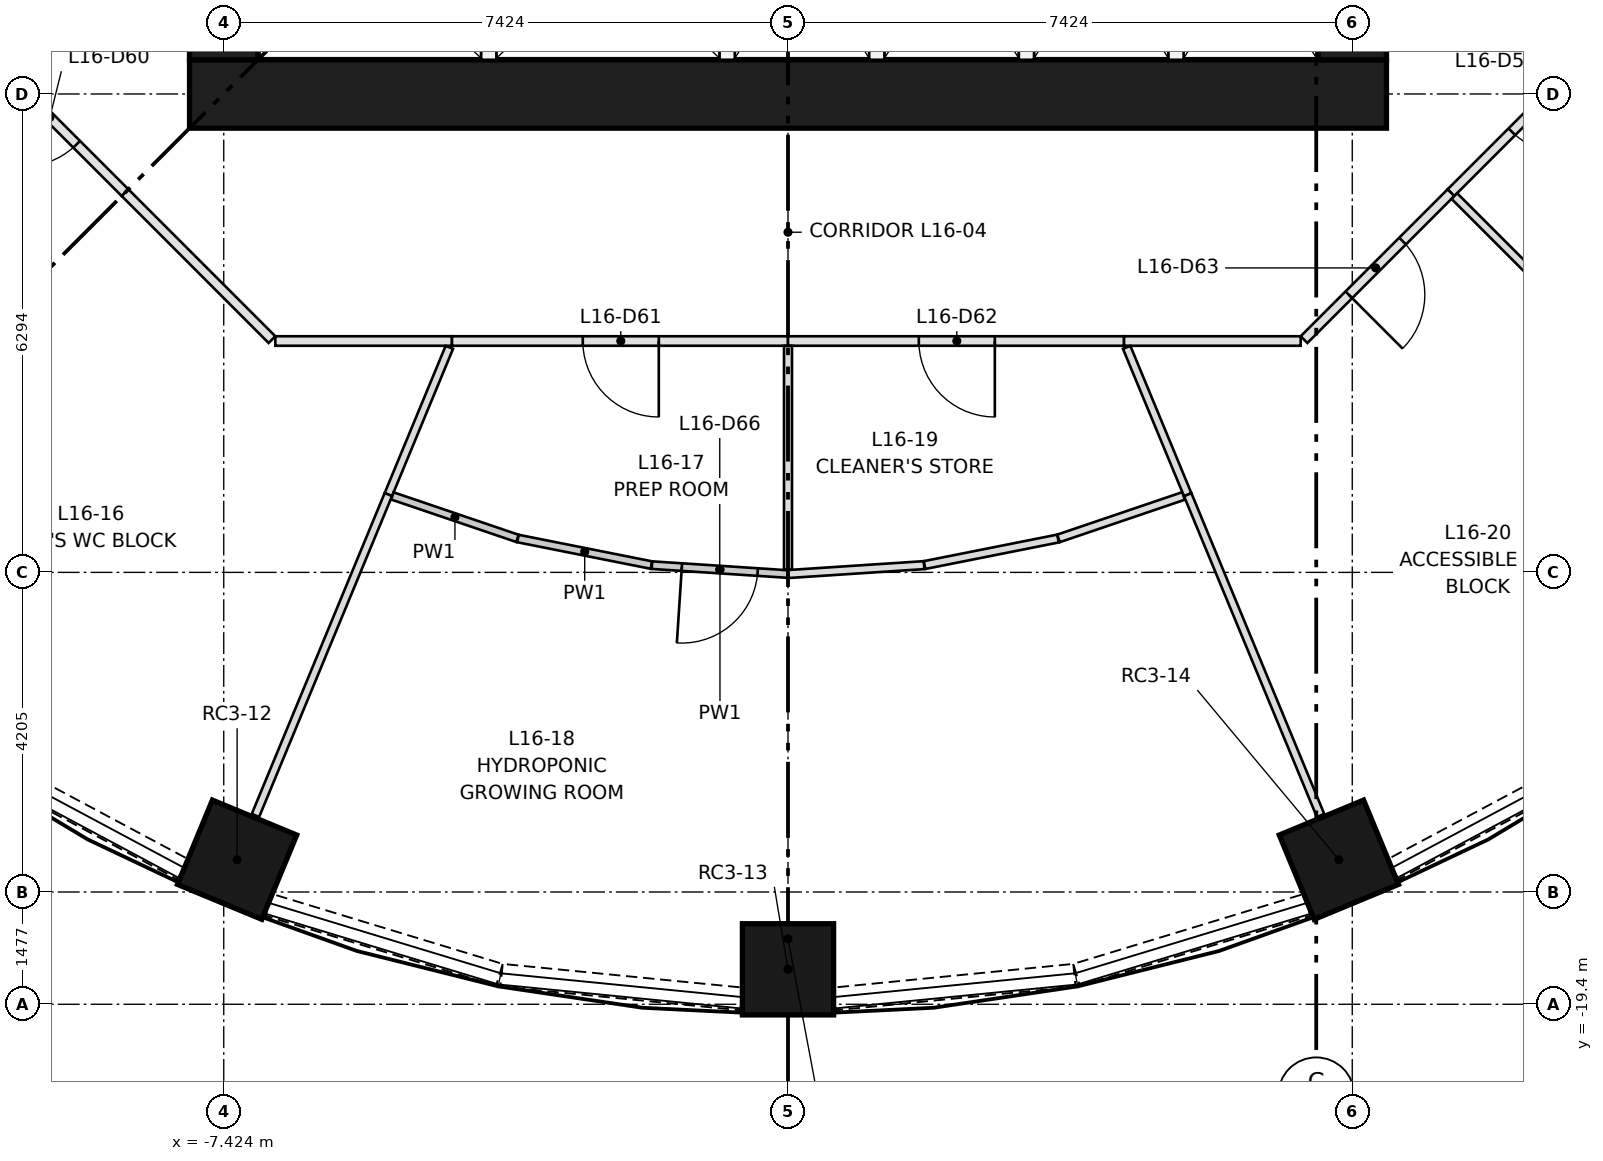
"""IFC4 building model, lengths in metres.
Left out: names, types, materials, properties, quantities, classifications, styles, units other than length and angle.
Written with IfcOpenShell. Run it as: python <this file> out.ifc"""

import sys

from ifc_helpers import new_model, si_unit, direction, frame, frame_2d, origin, origin_2d, place, context, subcontext, project, spatial, rectangle, extrude, element, fill, save


model = new_model("IFC4")
c1 = context("Model", 3, precision=1e-05, world=origin(), true_north=direction((0.0, 1.0)))
c2 = subcontext(c1, "Body", "Model", "MODEL_VIEW")
j1 = project(units=[si_unit("LENGTHUNIT", "METRE"), si_unit("PLANEANGLEUNIT", "RADIAN")], contexts=[c1])
p1 = place(None, origin())
s1 = spatial("IfcSite", under=j1, at=p1, CompositionType="ELEMENT")
p2 = place(p1, origin())
s2 = spatial("IfcBuilding", under=s1, at=p2, CompositionType="ELEMENT")
p3 = place(p2, frame((0.0, 0.0, 62.7)))
s3 = spatial("IfcBuildingStorey", under=s2, at=p3, CompositionType="ELEMENT", Elevation=62.7)
for number, where, z_axis, x_axis in (
    (1, (-7.248, -17.498, 0.0), (0.0, 0.0, 1.0), (-0.383, -0.924, 0.0)),
    (2, (0.0, -18.94, 0.0), (0.0, 0.0, 1.0), (0.0, -1.0, 0.0)),
    (3, (7.248, -17.498, 0.0), (0.0, 0.0, 1.0), (0.383, -0.924, 0.0)),
):
    element("IfcColumn", number, at=place(p3, frame(where, z_axis=z_axis, x_axis=x_axis)), inside=s3, PredefinedType="COLUMN", context=c2, shape_type="SweptSolid", body=[
        extrude(rectangle(XDim=1.2, YDim=1.2, at=origin_2d()), origin(), (0.0, 0.0, 1.0), 3.65),
    ])
p4 = place(p3, frame((-7.874, -7.424, 0.0), z_axis=(0.0, 0.0, 1.0), x_axis=(1.0, 0.0, 0.0)))
e4 = element("IfcWall", 4, at=p4, inside=s3, PredefinedType="SHEAR", context=c2, shape_type="SweptSolid", body=[
    extrude(rectangle(XDim=15.748, YDim=0.9, at=frame_2d((7.874, 0.0))), origin(), (0.0, 0.0, 1.0), 3.65),
])
p5 = place(p3, frame((-7.424, -6.974, 0.0), z_axis=(0.0, 0.0, 1.0), x_axis=(0.0, 1.0, 0.0)))
e5 = element("IfcWall", 5, at=p5, inside=s3, PredefinedType="SHEAR", context=c2, shape_type="SweptSolid", body=[
    extrude(rectangle(XDim=13.948, YDim=0.9, at=frame_2d((6.974, 0.0))), origin(), (0.0, 0.0, 1.0), 3.65),
])
p6 = place(p5, frame((6.474, 0.0, 0.0)))
e6 = element("IfcOpeningElement", 6, at=p6, cuts=e5, PredefinedType="OPENING", context=c2, shape_type="SweptSolid", body=[
    extrude(rectangle(XDim=1.0, YDim=2.1, at=frame_2d((0.5, 1.05))), frame((0.0, 0.46, 0.0), z_axis=(0.0, -1.0, 0.0), x_axis=(1.0, 0.0, 0.0)), (0.0, 0.0, 1.0), 0.92),
])
p7 = place(p5, frame((3.35, 0.0, 0.0)))
e7 = element("IfcOpeningElement", 7, at=p7, cuts=e5, PredefinedType="OPENING", context=c2, shape_type="SweptSolid", body=[
    extrude(rectangle(XDim=1.8, YDim=2.1, at=frame_2d((0.9, 1.05))), frame((0.0, 0.46, 0.0), z_axis=(0.0, -1.0, 0.0), x_axis=(1.0, 0.0, 0.0)), (0.0, 0.0, 1.0), 0.92),
])
p8 = place(p5, frame((8.799, 0.0, 0.0)))
e8 = element("IfcOpeningElement", 8, at=p8, cuts=e5, PredefinedType="OPENING", context=c2, shape_type="SweptSolid", body=[
    extrude(rectangle(XDim=1.8, YDim=2.1, at=frame_2d((0.9, 1.05))), frame((0.0, 0.46, 0.0), z_axis=(0.0, -1.0, 0.0), x_axis=(1.0, 0.0, 0.0)), (0.0, 0.0, 1.0), 0.92),
])
p9 = place(p5, frame((11.974, 0.0, 0.0)))
e9 = element("IfcOpeningElement", 9, at=p9, cuts=e5, PredefinedType="OPENING", context=c2, shape_type="SweptSolid", body=[
    extrude(rectangle(XDim=1.0, YDim=2.1, at=frame_2d((0.5, 1.05))), frame((0.0, 0.46, 0.0), z_axis=(0.0, -1.0, 0.0), x_axis=(1.0, 0.0, 0.0)), (0.0, 0.0, 1.0), 0.92),
])
p10 = place(p3, frame((7.424, -6.974, 0.0), z_axis=(0.0, 0.0, 1.0), x_axis=(0.0, 1.0, 0.0)))
e10 = element("IfcWall", 10, at=p10, inside=s3, PredefinedType="SHEAR", context=c2, shape_type="SweptSolid", body=[
    extrude(rectangle(XDim=13.948, YDim=0.9, at=frame_2d((6.974, 0.0))), origin(), (0.0, 0.0, 1.0), 3.65),
])
p11 = place(p10, frame((6.474, 0.0, 0.0)))
e11 = element("IfcOpeningElement", 11, at=p11, cuts=e10, PredefinedType="OPENING", context=c2, shape_type="SweptSolid", body=[
    extrude(rectangle(XDim=1.0, YDim=2.1, at=frame_2d((0.5, 1.05))), frame((0.0, 0.46, 0.0), z_axis=(0.0, -1.0, 0.0), x_axis=(1.0, 0.0, 0.0)), (0.0, 0.0, 1.0), 0.92),
])
p12 = place(p10, frame((3.35, 0.0, 0.0)))
e12 = element("IfcOpeningElement", 12, at=p12, cuts=e10, PredefinedType="OPENING", context=c2, shape_type="SweptSolid", body=[
    extrude(rectangle(XDim=1.8, YDim=2.1, at=frame_2d((0.9, 1.05))), frame((0.0, 0.46, 0.0), z_axis=(0.0, -1.0, 0.0), x_axis=(1.0, 0.0, 0.0)), (0.0, 0.0, 1.0), 0.92),
])
p13 = place(p10, frame((8.799, 0.0, 0.0)))
e13 = element("IfcOpeningElement", 13, at=p13, cuts=e10, PredefinedType="OPENING", context=c2, shape_type="SweptSolid", body=[
    extrude(rectangle(XDim=1.8, YDim=2.1, at=frame_2d((0.9, 1.05))), frame((0.0, 0.46, 0.0), z_axis=(0.0, -1.0, 0.0), x_axis=(1.0, 0.0, 0.0)), (0.0, 0.0, 1.0), 0.92),
])
for number, where, z_axis, x_axis in (
    (14, (-3.937, -6.974, 0.0), (0.0, 0.0, 1.0), (0.0, 1.0, 0.0)),
    (15, (-0.8, -6.974, 0.0), (0.0, 0.0, 1.0), (0.0, 1.0, 0.0)),
    (16, (1.168, -6.974, 0.0), (0.0, 0.0, 1.0), (0.0, 1.0, 0.0)),
    (17, (3.137, -6.974, 0.0), (0.0, 0.0, 1.0), (0.0, 1.0, 0.0)),
    (18, (5.105, -6.974, 0.0), (0.0, 0.0, 1.0), (0.0, 1.0, 0.0)),
):
    element("IfcWall", number, at=place(p3, frame(where, z_axis=z_axis, x_axis=x_axis)), inside=s3, PredefinedType="PARTITIONING", context=c2, shape_type="SweptSolid", body=[
        extrude(rectangle(XDim=2.8, YDim=0.2, at=frame_2d((1.4, 0.0))), origin(), (0.0, 0.0, 1.0), 3.3),
    ])
p14 = place(p3, frame((-10.759, -16.129, 0.0), z_axis=(0.0, 0.0, 1.0), x_axis=(0.882007292685, -0.47123575379, 0.0)))
e19 = element("IfcWall", 19, at=p14, inside=s3, PredefinedType="SOLIDWALL", context=c2, shape_type="SweptSolid", body=[
    extrude(rectangle(XDim=3.17, YDim=0.3, at=frame_2d((1.585, 0.0))), origin(), (0.0, 0.0, 1.0), 0.9),
])
p15 = place(p3, frame((-6.83, -18.092, 0.0), z_axis=(0.0, 0.0, 1.0), x_axis=(0.956888224489, -0.290456409527, 0.0)))
e20 = element("IfcWall", 20, at=p15, inside=s3, PredefinedType="SOLIDWALL", context=c2, shape_type="SweptSolid", body=[
    extrude(rectangle(XDim=3.169, YDim=0.3, at=frame_2d((1.584, 0.0))), origin(), (0.0, 0.0, 1.0), 0.9),
])
for number, where, z_axis, x_axis in (
    (21, (-3.768, -19.019, 0.0), (0.0, 0.0, 1.0), (0.995, -0.098, 0.0)),
    (22, (0.613, -19.33, 0.0), (0.0, 0.0, 1.0), (0.995, 0.098, 0.0)),
):
    element("IfcWall", number, at=place(p3, frame(where, z_axis=z_axis, x_axis=x_axis)), inside=s3, PredefinedType="SOLIDWALL", context=c2, shape_type="SweptSolid", body=[
        extrude(rectangle(XDim=3.171, YDim=0.3, at=frame_2d((1.585, 0.0))), origin(), (0.0, 0.0, 1.0), 0.9),
    ])
p16 = place(p3, frame((3.797, -19.013, 0.0), z_axis=(0.0, 0.0, 1.0), x_axis=(0.956888224489, 0.290456409527, 0.0)))
e23 = element("IfcWall", 23, at=p16, inside=s3, PredefinedType="SOLIDWALL", context=c2, shape_type="SweptSolid", body=[
    extrude(rectangle(XDim=3.169, YDim=0.3, at=frame_2d((1.584, 0.0))), origin(), (0.0, 0.0, 1.0), 0.9),
])
p17 = place(p3, frame((7.963, -17.623, 0.0), z_axis=(0.0, 0.0, 1.0), x_axis=(0.882007292685, 0.47123575379, 0.0)))
e24 = element("IfcWall", 24, at=p17, inside=s3, PredefinedType="SOLIDWALL", context=c2, shape_type="SweptSolid", body=[
    extrude(rectangle(XDim=3.17, YDim=0.3, at=frame_2d((1.585, 0.0))), origin(), (0.0, 0.0, 1.0), 0.9),
])
p18 = place(p3, frame((10.656, -6.789, 0.0), z_axis=(0.0, 0.0, 1.0), x_axis=(-0.707151428813, -0.707062130741, 0.0)))
e25 = element("IfcWall", 25, at=p18, inside=s3, PredefinedType="PARTITIONING", context=c2, shape_type="SweptSolid", body=[
    extrude(rectangle(XDim=2.734, YDim=0.125, at=frame_2d((1.367, 0.0))), origin(), (0.0, 0.0, 1.0), 3.3),
])
p19 = place(p18, frame((0.6, 0.0, 0.0)))
e26 = element("IfcOpeningElement", 26, at=p19, cuts=e25, PredefinedType="OPENING", context=c2, shape_type="SweptSolid", body=[
    extrude(rectangle(XDim=1.0, YDim=2.1, at=frame_2d((0.5, 1.05))), frame((0.0, 0.073, 0.0), z_axis=(0.0, -1.0, 0.0), x_axis=(1.0, 0.0, 0.0)), (0.0, 0.0, 1.0), 0.145),
])
p20 = place(p3, frame((-8.722, -8.722, 0.0), z_axis=(0.0, 0.0, 1.0), x_axis=(-0.707151428813, 0.707062130741, 0.0)))
e27 = element("IfcWall", 27, at=p20, inside=s3, PredefinedType="PARTITIONING", context=c2, shape_type="SweptSolid", body=[
    extrude(rectangle(XDim=2.734, YDim=0.125, at=frame_2d((1.367, 0.0))), origin(), (0.0, 0.0, 1.0), 3.3),
])
p21 = place(p20, frame((0.9, 0.0, 0.0)))
e28 = element("IfcOpeningElement", 28, at=p21, cuts=e27, PredefinedType="OPENING", context=c2, shape_type="SweptSolid", body=[
    extrude(rectangle(XDim=1.0, YDim=2.1, at=frame_2d((0.5, 1.05))), frame((0.0, 0.073, 0.0), z_axis=(0.0, -1.0, 0.0), x_axis=(1.0, 0.0, 0.0)), (0.0, 0.0, 1.0), 0.145),
])
p22 = place(p3, frame((-6.789, -10.656, 0.0), z_axis=(0.0, 0.0, 1.0), x_axis=(-0.707062130741, 0.707151428813, 0.0)))
e29 = element("IfcWall", 29, at=p22, inside=s3, PredefinedType="PARTITIONING", context=c2, shape_type="SweptSolid", body=[
    extrude(rectangle(XDim=2.734, YDim=0.125, at=frame_2d((1.367, 0.0))), origin(), (0.0, 0.0, 1.0), 3.3),
])
p23 = place(p3, frame((-4.421, -10.674, 0.0), z_axis=(0.0, 0.0, 1.0), x_axis=(-1.0, 0.0, 0.0)))
e30 = element("IfcWall", 30, at=p23, inside=s3, PredefinedType="PARTITIONING", context=c2, shape_type="SweptSolid", body=[
    extrude(rectangle(XDim=2.324, YDim=0.125, at=frame_2d((1.162, 0.0))), origin(), (0.0, 0.0, 1.0), 3.3),
])
p24 = place(p3, frame((0.0, -10.674, 0.0), z_axis=(0.0, 0.0, 1.0), x_axis=(-1.0, 0.0, 0.0)))
e31 = element("IfcWall", 31, at=p24, inside=s3, PredefinedType="PARTITIONING", context=c2, shape_type="SweptSolid", body=[
    extrude(rectangle(XDim=4.421, YDim=0.125, at=frame_2d((2.211, 0.0))), origin(), (0.0, 0.0, 1.0), 3.3),
])
p25 = place(p24, frame((1.7, 0.0, 0.0)))
e32 = element("IfcOpeningElement", 32, at=p25, cuts=e31, PredefinedType="OPENING", context=c2, shape_type="SweptSolid", body=[
    extrude(rectangle(XDim=1.0, YDim=2.1, at=frame_2d((0.5, 1.05))), frame((0.0, 0.073, 0.0), z_axis=(0.0, -1.0, 0.0), x_axis=(1.0, 0.0, 0.0)), (0.0, 0.0, 1.0), 0.145),
])
p26 = place(p3, frame((4.421, -10.674, 0.0), z_axis=(0.0, 0.0, 1.0), x_axis=(-1.0, 0.0, 0.0)))
e33 = element("IfcWall", 33, at=p26, inside=s3, PredefinedType="PARTITIONING", context=c2, shape_type="SweptSolid", body=[
    extrude(rectangle(XDim=4.421, YDim=0.125, at=frame_2d((2.211, 0.0))), origin(), (0.0, 0.0, 1.0), 3.3),
])
p27 = place(p26, frame((1.7, 0.0, 0.0)))
e34 = element("IfcOpeningElement", 34, at=p27, cuts=e33, PredefinedType="OPENING", context=c2, shape_type="SweptSolid", body=[
    extrude(rectangle(XDim=1.0, YDim=2.1, at=frame_2d((0.5, 1.05))), frame((0.0, 0.073, 0.0), z_axis=(0.0, -1.0, 0.0), x_axis=(1.0, 0.0, 0.0)), (0.0, 0.0, 1.0), 0.145),
])
p28 = place(p3, frame((6.745, -10.674, 0.0), z_axis=(0.0, 0.0, 1.0), x_axis=(-1.0, 0.0, 0.0)))
e35 = element("IfcWall", 35, at=p28, inside=s3, PredefinedType="PARTITIONING", context=c2, shape_type="SweptSolid", body=[
    extrude(rectangle(XDim=2.324, YDim=0.125, at=frame_2d((1.162, 0.0))), origin(), (0.0, 0.0, 1.0), 3.3),
])
p29 = place(p3, frame((8.722, -8.722, 0.0), z_axis=(0.0, 0.0, 1.0), x_axis=(-0.707062130741, -0.707151428813, 0.0)))
e36 = element("IfcWall", 36, at=p29, inside=s3, PredefinedType="PARTITIONING", context=c2, shape_type="SweptSolid", body=[
    extrude(rectangle(XDim=2.734, YDim=0.125, at=frame_2d((1.367, 0.0))), origin(), (0.0, 0.0, 1.0), 3.3),
])
p30 = place(p29, frame((0.9, 0.0, 0.0)))
e37 = element("IfcOpeningElement", 37, at=p30, cuts=e36, PredefinedType="OPENING", context=c2, shape_type="SweptSolid", body=[
    extrude(rectangle(XDim=1.0, YDim=2.1, at=frame_2d((0.5, 1.05))), frame((0.0, 0.073, 0.0), z_axis=(0.0, -1.0, 0.0), x_axis=(1.0, 0.0, 0.0)), (0.0, 0.0, 1.0), 0.145),
])
p31 = place(p3, frame((-4.456, -10.757, 0.0), z_axis=(0.0, 0.0, 1.0), x_axis=(-0.382663674763, -0.92388771613, 0.0)))
e38 = element("IfcWall", 38, at=p31, inside=s3, PredefinedType="PARTITIONING", context=c2, shape_type="SweptSolid", body=[
    extrude(rectangle(XDim=2.097, YDim=0.105, at=frame_2d((1.049, 0.0))), origin(), (0.0, 0.0, 1.0), 3.3),
])
p32 = place(p3, frame((-5.258, -12.694, 0.0), z_axis=(0.0, 0.0, 1.0), x_axis=(-0.382710364739, -0.923868376297, 0.0)))
e39 = element("IfcWall", 39, at=p32, inside=s3, PredefinedType="PARTITIONING", context=c2, shape_type="SweptSolid", body=[
    extrude(rectangle(XDim=4.57, YDim=0.105, at=frame_2d((2.285, 0.0))), origin(), (0.0, 0.0, 1.0), 3.3),
])
p33 = place(p3, frame((-3.559, -13.271, 0.0), z_axis=(0.0, 0.0, 1.0), x_axis=(-0.946941295521, 0.321406569374, 0.0)))
e40 = element("IfcWall", 40, at=p33, inside=s3, PredefinedType="PARTITIONING", context=c2, shape_type="SweptSolid", body=[
    extrude(rectangle(XDim=1.738, YDim=0.1, at=frame_2d((0.869, 0.0))), origin(), (0.0, 0.0, 1.0), 3.3),
])
p34 = place(p3, frame((-1.797, -13.622, 0.0), z_axis=(0.0, 0.0, 1.0), x_axis=(-0.980784643133, 0.195093525761, 0.0)))
e41 = element("IfcWall", 41, at=p34, inside=s3, PredefinedType="PARTITIONING", context=c2, shape_type="SweptSolid", body=[
    extrude(rectangle(XDim=1.791, YDim=0.1, at=frame_2d((0.896, 0.0))), origin(), (0.0, 0.0, 1.0), 3.3),
])
p35 = place(p3, frame((0.0, -13.74, 0.0), z_axis=(0.0, 0.0, 1.0), x_axis=(-0.997863935765, 0.065326607906, 0.0)))
e42 = element("IfcWall", 42, at=p35, inside=s3, PredefinedType="PARTITIONING", context=c2, shape_type="SweptSolid", body=[
    extrude(rectangle(XDim=1.794, YDim=0.1, at=frame_2d((0.897, 0.0))), origin(), (0.0, 0.0, 1.0), 3.3),
])
p36 = place(p35, frame((0.4, 0.0, 0.0)))
e43 = element("IfcOpeningElement", 43, at=p36, cuts=e42, PredefinedType="OPENING", context=c2, shape_type="SweptSolid", body=[
    extrude(rectangle(XDim=1.0, YDim=2.1, at=frame_2d((0.5, 1.05))), frame((0.0, 0.06, 0.0), z_axis=(0.0, -1.0, 0.0), x_axis=(1.0, 0.0, 0.0)), (0.0, 0.0, 1.0), 0.12),
])
p37 = place(p3, frame((0.0, -10.737, 0.0), z_axis=(0.0, 0.0, 1.0), x_axis=(0.0, -1.0, 0.0)))
e44 = element("IfcWall", 44, at=p37, inside=s3, PredefinedType="PARTITIONING", context=c2, shape_type="SweptSolid", body=[
    extrude(rectangle(XDim=2.947, YDim=0.105, at=frame_2d((1.474, 0.0))), origin(), (0.0, 0.0, 1.0), 3.3),
])
p38 = place(p3, frame((0.0, -13.74, 0.0), z_axis=(0.0, 0.0, 1.0), x_axis=(0.997863935765, 0.065326607906, 0.0)))
e45 = element("IfcWall", 45, at=p38, inside=s3, PredefinedType="PARTITIONING", context=c2, shape_type="SweptSolid", body=[
    extrude(rectangle(XDim=1.794, YDim=0.105, at=frame_2d((0.897, 0.0))), origin(), (0.0, 0.0, 1.0), 3.3),
])
p39 = place(p3, frame((1.797, -13.622, 0.0), z_axis=(0.0, 0.0, 1.0), x_axis=(0.980774260843, 0.195145712912, 0.0)))
e46 = element("IfcWall", 46, at=p39, inside=s3, PredefinedType="PARTITIONING", context=c2, shape_type="SweptSolid", body=[
    extrude(rectangle(XDim=1.79, YDim=0.105, at=frame_2d((0.895, 0.0))), origin(), (0.0, 0.0, 1.0), 3.3),
])
p40 = place(p3, frame((3.56, -13.271, 0.0), z_axis=(0.0, 0.0, 1.0), x_axis=(0.946926781261, 0.321449328713, 0.0)))
e47 = element("IfcWall", 47, at=p40, inside=s3, PredefinedType="PARTITIONING", context=c2, shape_type="SweptSolid", body=[
    extrude(rectangle(XDim=1.738, YDim=0.105, at=frame_2d((0.869, 0.0))), origin(), (0.0, 0.0, 1.0), 3.3),
])
p41 = place(p3, frame((5.258, -12.694, 0.0), z_axis=(0.0, 0.0, 1.0), x_axis=(0.382710364739, -0.923868376297, 0.0)))
e48 = element("IfcWall", 48, at=p41, inside=s3, PredefinedType="PARTITIONING", context=c2, shape_type="SweptSolid", body=[
    extrude(rectangle(XDim=4.57, YDim=0.105, at=frame_2d((2.285, 0.0))), origin(), (0.0, 0.0, 1.0), 3.3),
])
p42 = place(p3, frame((4.456, -10.757, 0.0), z_axis=(0.0, 0.0, 1.0), x_axis=(0.382663674763, -0.92388771613, 0.0)))
e49 = element("IfcWall", 49, at=p42, inside=s3, PredefinedType="PARTITIONING", context=c2, shape_type="SweptSolid", body=[
    extrude(rectangle(XDim=2.097, YDim=0.105, at=frame_2d((1.049, 0.0))), origin(), (0.0, 0.0, 1.0), 3.3),
])
p43 = place(p3, frame((8.767, -8.767, 0.0), z_axis=(0.0, 0.0, 1.0), x_axis=(0.707106781187, -0.707106781187, 0.0)))
e50 = element("IfcWall", 50, at=p43, inside=s3, PredefinedType="PARTITIONING", context=c2, shape_type="SweptSolid", body=[
    extrude(rectangle(XDim=5.912, YDim=0.105, at=frame_2d((2.956, 0.0))), origin(), (0.0, 0.0, 1.0), 3.3),
])
p44 = place(p19, origin())
e51 = element("IfcDoor", 51, at=p44, inside=s3, OperationType="SINGLE_SWING_LEFT", PredefinedType="DOOR", context=c2, shape_type="SweptSolid", body=[
    extrude(rectangle(XDim=1.0, YDim=2.1, at=frame_2d((0.5, 1.05))), frame((0.0, 0.025, 0.0), z_axis=(0.0, -1.0, 0.0), x_axis=(1.0, 0.0, 0.0)), (0.0, 0.0, 1.0), 0.05),
])
fill(e26, e51)
p45 = place(p21, origin())
e52 = element("IfcDoor", 52, at=p45, inside=s3, OperationType="SINGLE_SWING_RIGHT", PredefinedType="DOOR", context=c2, shape_type="SweptSolid", body=[
    extrude(rectangle(XDim=1.0, YDim=2.1, at=frame_2d((0.5, 1.05))), frame((0.0, 0.025, 0.0), z_axis=(0.0, -1.0, 0.0), x_axis=(1.0, 0.0, 0.0)), (0.0, 0.0, 1.0), 0.05),
])
fill(e28, e52)
p46 = place(p25, origin())
e53 = element("IfcDoor", 53, at=p46, inside=s3, OperationType="SINGLE_SWING_LEFT", PredefinedType="DOOR", context=c2, shape_type="SweptSolid", body=[
    extrude(rectangle(XDim=1.0, YDim=2.1, at=frame_2d((0.5, 1.05))), frame((0.0, 0.025, 0.0), z_axis=(0.0, -1.0, 0.0), x_axis=(1.0, 0.0, 0.0)), (0.0, 0.0, 1.0), 0.05),
])
fill(e32, e53)
p47 = place(p27, origin())
e54 = element("IfcDoor", 54, at=p47, inside=s3, OperationType="SINGLE_SWING_LEFT", PredefinedType="DOOR", context=c2, shape_type="SweptSolid", body=[
    extrude(rectangle(XDim=1.0, YDim=2.1, at=frame_2d((0.5, 1.05))), frame((0.0, 0.025, 0.0), z_axis=(0.0, -1.0, 0.0), x_axis=(1.0, 0.0, 0.0)), (0.0, 0.0, 1.0), 0.05),
])
fill(e34, e54)
p48 = place(p30, origin())
e55 = element("IfcDoor", 55, at=p48, inside=s3, OperationType="SINGLE_SWING_RIGHT", PredefinedType="DOOR", context=c2, shape_type="SweptSolid", body=[
    extrude(rectangle(XDim=1.0, YDim=2.1, at=frame_2d((0.5, 1.05))), frame((0.0, 0.025, 0.0), z_axis=(0.0, -1.0, 0.0), x_axis=(1.0, 0.0, 0.0)), (0.0, 0.0, 1.0), 0.05),
])
fill(e37, e55)
p49 = place(p36, origin())
e56 = element("IfcDoor", 56, at=p49, inside=s3, OperationType="SINGLE_SWING_RIGHT", PredefinedType="DOOR", context=c2, shape_type="SweptSolid", body=[
    extrude(rectangle(XDim=1.0, YDim=2.1, at=frame_2d((0.5, 1.05))), frame((0.0, 0.025, 0.0), z_axis=(0.0, -1.0, 0.0), x_axis=(1.0, 0.0, 0.0)), (0.0, 0.0, 1.0), 0.05),
])
fill(e43, e56)
save(model, sys.argv[1])
